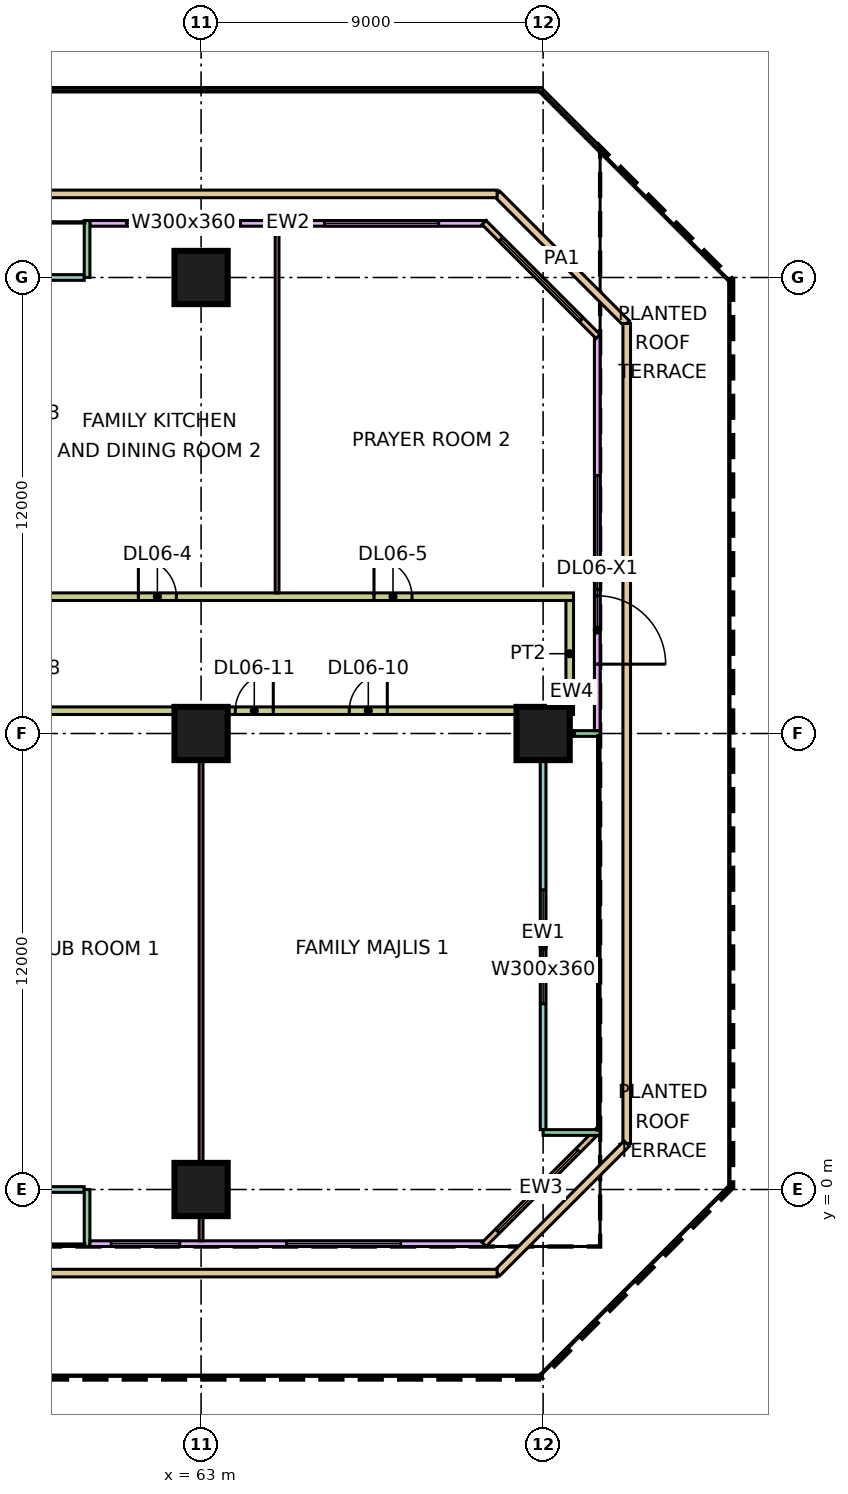
"""IFC4 building model, lengths in metres.
Left out: names, types, materials, properties, quantities, classifications, styles, units other than length and angle.
Written with IfcOpenShell. Run it as: python <this file> out.ifc"""

import sys

from ifc_helpers import new_model, si_unit, direction, frame, frame_2d, origin, origin_2d, place, context, subcontext, project, spatial, rectangle, extrude, element, fill, save


model = new_model("IFC4")
c1 = context("Model", 3, precision=1e-05, world=origin(), true_north=direction((0.0, 1.0)))
c2 = subcontext(c1, "Body", "Model", "MODEL_VIEW")
j1 = project(units=[si_unit("LENGTHUNIT", "METRE"), si_unit("PLANEANGLEUNIT", "RADIAN")], contexts=[c1])
p1 = place(None, origin())
s1 = spatial("IfcSite", under=j1, at=p1, CompositionType="ELEMENT")
p2 = place(p1, origin())
s2 = spatial("IfcBuilding", under=s1, at=p2, CompositionType="ELEMENT")
p3 = place(p2, frame((0.0, 0.0, 35.4)))
s3 = spatial("IfcBuildingStorey", under=s2, at=p3, CompositionType="ELEMENT", Elevation=35.4)
for number, where, z_axis, x_axis in (
    (1, (63.0, 0.0, 0.0), (0.0, 0.0, 1.0), (1.0, 0.0, 0.0)),
    (2, (63.0, 12.0, 0.0), (0.0, 0.0, 1.0), (1.0, 0.0, 0.0)),
    (3, (63.0, 24.0, 0.0), (0.0, 0.0, 1.0), (1.0, 0.0, 0.0)),
    (4, (72.0, 12.0, 0.0), (0.0, 0.0, 1.0), (1.0, 0.0, 0.0)),
):
    element("IfcColumn", number, at=place(p3, frame(where, z_axis=z_axis, x_axis=x_axis)), inside=s3, PredefinedType="COLUMN", context=c2, shape_type="SweptSolid", body=[
        extrude(rectangle(XDim=1.4, YDim=1.4, at=origin_2d()), origin(), (0.0, 0.0, 1.0), 6.0),
    ])
p4 = place(p3, frame((70.5, 25.425, 0.0), z_axis=(0.0, 0.0, 1.0), x_axis=(-1.0, 0.0, 0.0)))
e5 = element("IfcWall", 5, at=p4, inside=s3, PredefinedType="SOLIDWALL", context=c2, shape_type="SweptSolid", body=[
    extrude(rectangle(XDim=10.425, YDim=0.15, at=frame_2d((5.212, 0.0))), origin(), (0.0, 0.0, 1.0), 5.6),
])
p5 = place(p4, frame((1.25, 0.0, 0.45)))
e6 = element("IfcOpeningElement", 6, at=p5, cuts=e5, PredefinedType="OPENING", context=c2, shape_type="SweptSolid", body=[
    extrude(rectangle(XDim=3.0, YDim=3.6, at=frame_2d((1.5, 1.8))), frame((0.0, 0.085, 0.0), z_axis=(0.0, -1.0, 0.0), x_axis=(1.0, 0.0, 0.0)), (0.0, 0.0, 1.0), 0.17),
])
p6 = place(p4, frame((6.462, 0.0, 0.45)))
e7 = element("IfcOpeningElement", 7, at=p6, cuts=e5, PredefinedType="OPENING", context=c2, shape_type="SweptSolid", body=[
    extrude(rectangle(XDim=3.0, YDim=3.6, at=frame_2d((1.5, 1.8))), frame((0.0, 0.085, 0.0), z_axis=(0.0, -1.0, 0.0), x_axis=(1.0, 0.0, 0.0)), (0.0, 0.0, 1.0), 0.17),
])
p7 = place(p3, frame((59.925, 24.0, 0.0), z_axis=(0.0, 0.0, 1.0), x_axis=(-1.0, 0.0, 0.0)))
e8 = element("IfcWall", 8, at=p7, inside=s3, PredefinedType="SOLIDWALL", context=c2, shape_type="SweptSolid", body=[
    extrude(rectangle(XDim=11.85, YDim=0.15, at=frame_2d((5.925, 0.0))), origin(), (0.0, 0.0, 1.0), 5.6),
])
p8 = place(p7, frame((1.625, 0.0, 0.45)))
e9 = element("IfcOpeningElement", 9, at=p8, cuts=e8, PredefinedType="OPENING", context=c2, shape_type="SweptSolid", body=[
    extrude(rectangle(XDim=3.0, YDim=3.6, at=frame_2d((1.5, 1.8))), frame((0.0, 0.085, 0.0), z_axis=(0.0, -1.0, 0.0), x_axis=(1.0, 0.0, 0.0)), (0.0, 0.0, 1.0), 0.17),
])
p9 = place(p7, frame((8.087, 0.0, 0.45)))
e10 = element("IfcOpeningElement", 10, at=p9, cuts=e8, PredefinedType="OPENING", context=c2, shape_type="SweptSolid", body=[
    extrude(rectangle(XDim=3.0, YDim=3.6, at=frame_2d((1.5, 1.8))), frame((0.0, 0.085, 0.0), z_axis=(0.0, -1.0, 0.0), x_axis=(1.0, 0.0, 0.0)), (0.0, 0.0, 1.0), 0.17),
])
p10 = place(p3, frame((60.0, 25.5, 0.0), z_axis=(0.0, 0.0, 1.0), x_axis=(0.0, -1.0, 0.0)))
e11 = element("IfcWall", 11, at=p10, inside=s3, PredefinedType="SOLIDWALL", context=c2, shape_type="SweptSolid", body=[
    extrude(rectangle(XDim=1.5, YDim=0.15, at=frame_2d((0.75, 0.0))), origin(), (0.0, 0.0, 1.0), 5.6),
])
p11 = place(p3, frame((48.075, 0.0, 0.0), z_axis=(0.0, 0.0, 1.0), x_axis=(1.0, 0.0, 0.0)))
e12 = element("IfcWall", 12, at=p11, inside=s3, PredefinedType="SOLIDWALL", context=c2, shape_type="SweptSolid", body=[
    extrude(rectangle(XDim=11.85, YDim=0.15, at=frame_2d((5.925, 0.0))), origin(), (0.0, 0.0, 1.0), 5.6),
])
p12 = place(p11, frame((2.125, 0.0, 0.45)))
e13 = element("IfcOpeningElement", 13, at=p12, cuts=e12, PredefinedType="OPENING", context=c2, shape_type="SweptSolid", body=[
    extrude(rectangle(XDim=2.4, YDim=3.6, at=frame_2d((1.2, 1.8))), frame((0.0, 0.085, 0.0), z_axis=(0.0, -1.0, 0.0), x_axis=(1.0, 0.0, 0.0)), (0.0, 0.0, 1.0), 0.17),
])
p13 = place(p11, frame((7.788, 0.0, 0.45)))
e14 = element("IfcOpeningElement", 14, at=p13, cuts=e12, PredefinedType="OPENING", context=c2, shape_type="SweptSolid", body=[
    extrude(rectangle(XDim=3.0, YDim=3.6, at=frame_2d((1.5, 1.8))), frame((0.0, 0.085, 0.0), z_axis=(0.0, -1.0, 0.0), x_axis=(1.0, 0.0, 0.0)), (0.0, 0.0, 1.0), 0.17),
])
p14 = place(p3, frame((60.0, -1.5, 0.0), z_axis=(0.0, 0.0, 1.0), x_axis=(0.0, 1.0, 0.0)))
e15 = element("IfcWall", 15, at=p14, inside=s3, PredefinedType="SOLIDWALL", context=c2, shape_type="SweptSolid", body=[
    extrude(rectangle(XDim=1.5, YDim=0.15, at=frame_2d((0.75, 0.0))), origin(), (0.0, 0.0, 1.0), 5.6),
])
p15 = place(p3, frame((60.075, -1.425, 0.0), z_axis=(0.0, 0.0, 1.0), x_axis=(1.0, 0.0, 0.0)))
e16 = element("IfcWall", 16, at=p15, inside=s3, PredefinedType="SOLIDWALL", context=c2, shape_type="SweptSolid", body=[
    extrude(rectangle(XDim=10.425, YDim=0.15, at=frame_2d((5.212, 0.0))), origin(), (0.0, 0.0, 1.0), 5.6),
])
p16 = place(p15, frame((0.562, 0.0, 0.45)))
e17 = element("IfcOpeningElement", 17, at=p16, cuts=e16, PredefinedType="OPENING", context=c2, shape_type="SweptSolid", body=[
    extrude(rectangle(XDim=1.8, YDim=3.6, at=frame_2d((0.9, 1.8))), frame((0.0, 0.085, 0.0), z_axis=(0.0, -1.0, 0.0), x_axis=(1.0, 0.0, 0.0)), (0.0, 0.0, 1.0), 0.17),
])
p17 = place(p15, frame((5.175, 0.0, 0.45)))
e18 = element("IfcOpeningElement", 18, at=p17, cuts=e16, PredefinedType="OPENING", context=c2, shape_type="SweptSolid", body=[
    extrude(rectangle(XDim=3.0, YDim=3.6, at=frame_2d((1.5, 1.8))), frame((0.0, 0.085, 0.0), z_axis=(0.0, -1.0, 0.0), x_axis=(1.0, 0.0, 0.0)), (0.0, 0.0, 1.0), 0.17),
])
p18 = place(p3, frame((70.447, -1.447, 0.0), z_axis=(0.0, 0.0, 1.0), x_axis=(0.707106781187, 0.707106781187, 0.0)))
e19 = element("IfcWall", 19, at=p18, inside=s3, PredefinedType="SOLIDWALL", context=c2, shape_type="SweptSolid", body=[
    extrude(rectangle(XDim=4.243, YDim=0.15, at=frame_2d((2.121, 0.0))), origin(), (0.0, 0.0, 1.0), 5.6),
])
p19 = place(p18, frame((0.498, 0.0, 0.45)))
e20 = element("IfcOpeningElement", 20, at=p19, cuts=e19, PredefinedType="OPENING", context=c2, shape_type="SweptSolid", body=[
    extrude(rectangle(XDim=3.0, YDim=3.6, at=frame_2d((1.5, 1.8))), frame((0.0, 0.085, 0.0), z_axis=(0.0, -1.0, 0.0), x_axis=(1.0, 0.0, 0.0)), (0.0, 0.0, 1.0), 0.17),
])
p20 = place(p3, frame((72.0, 1.575, 0.0), z_axis=(0.0, 0.0, 1.0), x_axis=(0.0, 1.0, 0.0)))
e21 = element("IfcWall", 21, at=p20, inside=s3, PredefinedType="SOLIDWALL", context=c2, shape_type="SweptSolid", body=[
    extrude(rectangle(XDim=10.35, YDim=0.15, at=frame_2d((5.175, 0.0))), origin(), (0.0, 0.0, 1.0), 5.6),
])
p21 = place(p20, frame((3.312, 0.0, 0.45)))
e22 = element("IfcOpeningElement", 22, at=p21, cuts=e21, PredefinedType="OPENING", context=c2, shape_type="SweptSolid", body=[
    extrude(rectangle(XDim=3.0, YDim=3.6, at=frame_2d((1.5, 1.8))), frame((0.0, 0.085, 0.0), z_axis=(0.0, -1.0, 0.0), x_axis=(1.0, 0.0, 0.0)), (0.0, 0.0, 1.0), 0.17),
])
for number, where, z_axis, x_axis in (
    (23, (73.5, 1.5, 0.0), (0.0, 0.0, 1.0), (-1.0, 0.0, 0.0)),
    (24, (73.5, 12.0, 0.0), (0.0, 0.0, 1.0), (-1.0, 0.0, 0.0)),
):
    element("IfcWall", number, at=place(p3, frame(where, z_axis=z_axis, x_axis=x_axis)), inside=s3, PredefinedType="SOLIDWALL", context=c2, shape_type="SweptSolid", body=[
        extrude(rectangle(XDim=1.5, YDim=0.15, at=frame_2d((0.75, 0.0))), origin(), (0.0, 0.0, 1.0), 5.6),
    ])
p22 = place(p3, frame((73.425, 12.075, 0.0), z_axis=(0.0, 0.0, 1.0), x_axis=(0.0, 1.0, 0.0)))
e25 = element("IfcWall", 25, at=p22, inside=s3, PredefinedType="SOLIDWALL", context=c2, shape_type="SweptSolid", body=[
    extrude(rectangle(XDim=10.425, YDim=0.15, at=frame_2d((5.212, 0.0))), origin(), (0.0, 0.0, 1.0), 5.6),
])
p23 = place(p22, frame((3.712, 0.0, 0.45)))
e26 = element("IfcOpeningElement", 26, at=p23, cuts=e25, PredefinedType="OPENING", context=c2, shape_type="SweptSolid", body=[
    extrude(rectangle(XDim=3.0, YDim=3.6, at=frame_2d((1.5, 1.8))), frame((0.0, 0.085, 0.0), z_axis=(0.0, -1.0, 0.0), x_axis=(1.0, 0.0, 0.0)), (0.0, 0.0, 1.0), 0.17),
])
p24 = place(p22, frame((1.75, 0.0, 0.0)))
e27 = element("IfcOpeningElement", 27, at=p24, cuts=e25, PredefinedType="OPENING", context=c2, shape_type="SweptSolid", body=[
    extrude(rectangle(XDim=1.8, YDim=2.4, at=frame_2d((0.9, 1.2))), frame((0.0, 0.085, 0.0), z_axis=(0.0, -1.0, 0.0), x_axis=(1.0, 0.0, 0.0)), (0.0, 0.0, 1.0), 0.17),
])
p25 = place(p3, frame((73.447, 22.447, 0.0), z_axis=(0.0, 0.0, 1.0), x_axis=(-0.707106781187, 0.707106781187, 0.0)))
e28 = element("IfcWall", 28, at=p25, inside=s3, PredefinedType="SOLIDWALL", context=c2, shape_type="SweptSolid", body=[
    extrude(rectangle(XDim=4.243, YDim=0.15, at=frame_2d((2.121, 0.0))), origin(), (0.0, 0.0, 1.0), 5.6),
])
p26 = place(p25, frame((0.621, 0.0, 0.45)))
e29 = element("IfcOpeningElement", 29, at=p26, cuts=e28, PredefinedType="OPENING", context=c2, shape_type="SweptSolid", body=[
    extrude(rectangle(XDim=3.0, YDim=3.6, at=frame_2d((1.5, 1.8))), frame((0.0, 0.085, 0.0), z_axis=(0.0, -1.0, 0.0), x_axis=(1.0, 0.0, 0.0)), (0.0, 0.0, 1.0), 0.17),
])
p27 = place(p3, frame((70.79, 26.2, 0.0), z_axis=(0.0, 0.0, 1.0), x_axis=(0.707106781187, -0.707106781187, 0.0)))
e30 = element("IfcWall", 30, at=p27, inside=s3, PredefinedType="PARAPET", context=c2, shape_type="SweptSolid", body=[
    extrude(rectangle(XDim=4.822, YDim=0.2, at=frame_2d((2.411, 0.0))), origin(), (0.0, 0.0, 1.0), 0.5),
])
p28 = place(p3, frame((74.2, 22.79, 0.0), z_axis=(0.0, 0.0, 1.0), x_axis=(0.0, -1.0, 0.0)))
e31 = element("IfcWall", 31, at=p28, inside=s3, PredefinedType="PARAPET", context=c2, shape_type="SweptSolid", body=[
    extrude(rectangle(XDim=21.58, YDim=0.2, at=frame_2d((10.79, 0.0))), origin(), (0.0, 0.0, 1.0), 0.5),
])
p29 = place(p3, frame((74.2, 1.21, 0.0), z_axis=(0.0, 0.0, 1.0), x_axis=(-0.707106781187, -0.707106781187, 0.0)))
e32 = element("IfcWall", 32, at=p29, inside=s3, PredefinedType="PARAPET", context=c2, shape_type="SweptSolid", body=[
    extrude(rectangle(XDim=4.822, YDim=0.2, at=frame_2d((2.411, 0.0))), origin(), (0.0, 0.0, 1.0), 0.5),
])
p30 = place(p3, frame((70.79, -2.2, 0.0), z_axis=(0.0, 0.0, 1.0), x_axis=(-1.0, 0.0, 0.0)))
e33 = element("IfcWall", 33, at=p30, inside=s3, PredefinedType="PARAPET", context=c2, shape_type="SweptSolid", body=[
    extrude(rectangle(XDim=58.58, YDim=0.2, at=frame_2d((29.29, 0.0))), origin(), (0.0, 0.0, 1.0), 0.5),
])
p31 = place(p3, frame((40.79, 26.2, 0.0), z_axis=(0.0, 0.0, 1.0), x_axis=(1.0, 0.0, 0.0)))
e34 = element("IfcWall", 34, at=p31, inside=s3, PredefinedType="PARAPET", context=c2, shape_type="SweptSolid", body=[
    extrude(rectangle(XDim=30.0, YDim=0.2, at=frame_2d((15.0, 0.0))), origin(), (0.0, 0.0, 1.0), 0.5),
])
p32 = place(p3, frame((51.225, 15.6, 0.0), z_axis=(0.0, 0.0, 1.0), x_axis=(1.0, 0.0, 0.0)))
e35 = element("IfcWall", 35, at=p32, inside=s3, PredefinedType="PARTITIONING", context=c2, shape_type="SweptSolid", body=[
    extrude(rectangle(XDim=21.575, YDim=0.2, at=frame_2d((10.788, 0.0))), origin(), (0.0, 0.0, 1.0), 5.6),
])
p33 = place(p32, frame((0.225, 0.0, 0.0)))
e36 = element("IfcOpeningElement", 36, at=p33, cuts=e35, PredefinedType="OPENING", context=c2, shape_type="SweptSolid", body=[
    extrude(rectangle(XDim=1.0, YDim=2.1, at=frame_2d((0.5, 1.05))), frame((0.0, 0.11, 0.0), z_axis=(0.0, -1.0, 0.0), x_axis=(1.0, 0.0, 0.0)), (0.0, 0.0, 1.0), 0.22),
])
p34 = place(p32, frame((3.925, 0.0, 0.0)))
e37 = element("IfcOpeningElement", 37, at=p34, cuts=e35, PredefinedType="OPENING", context=c2, shape_type="SweptSolid", body=[
    extrude(rectangle(XDim=1.0, YDim=2.1, at=frame_2d((0.5, 1.05))), frame((0.0, 0.11, 0.0), z_axis=(0.0, -1.0, 0.0), x_axis=(1.0, 0.0, 0.0)), (0.0, 0.0, 1.0), 0.22),
])
p35 = place(p32, frame((10.125, 0.0, 0.0)))
e38 = element("IfcOpeningElement", 38, at=p35, cuts=e35, PredefinedType="OPENING", context=c2, shape_type="SweptSolid", body=[
    extrude(rectangle(XDim=1.0, YDim=2.1, at=frame_2d((0.5, 1.05))), frame((0.0, 0.11, 0.0), z_axis=(0.0, -1.0, 0.0), x_axis=(1.0, 0.0, 0.0)), (0.0, 0.0, 1.0), 0.22),
])
p36 = place(p32, frame((16.325, 0.0, 0.0)))
e39 = element("IfcOpeningElement", 39, at=p36, cuts=e35, PredefinedType="OPENING", context=c2, shape_type="SweptSolid", body=[
    extrude(rectangle(XDim=1.0, YDim=2.1, at=frame_2d((0.5, 1.05))), frame((0.0, 0.11, 0.0), z_axis=(0.0, -1.0, 0.0), x_axis=(1.0, 0.0, 0.0)), (0.0, 0.0, 1.0), 0.22),
])
p37 = place(p3, frame((54.0, 12.6, 0.0), z_axis=(0.0, 0.0, 1.0), x_axis=(1.0, 0.0, 0.0)))
e40 = element("IfcWall", 40, at=p37, inside=s3, PredefinedType="PARTITIONING", context=c2, shape_type="SweptSolid", body=[
    extrude(rectangle(XDim=18.8, YDim=0.2, at=frame_2d((9.4, 0.0))), origin(), (0.0, 0.0, 1.0), 5.6),
])
p38 = place(p37, frame((3.9, 0.0, 0.0)))
e41 = element("IfcOpeningElement", 41, at=p38, cuts=e40, PredefinedType="OPENING", context=c2, shape_type="SweptSolid", body=[
    extrude(rectangle(XDim=1.0, YDim=2.1, at=frame_2d((0.5, 1.05))), frame((0.0, 0.11, 0.0), z_axis=(0.0, -1.0, 0.0), x_axis=(1.0, 0.0, 0.0)), (0.0, 0.0, 1.0), 0.22),
])
p39 = place(p37, frame((0.9, 0.0, 0.0)))
e42 = element("IfcOpeningElement", 42, at=p39, cuts=e40, PredefinedType="OPENING", context=c2, shape_type="SweptSolid", body=[
    extrude(rectangle(XDim=1.0, YDim=2.1, at=frame_2d((0.5, 1.05))), frame((0.0, 0.11, 0.0), z_axis=(0.0, -1.0, 0.0), x_axis=(1.0, 0.0, 0.0)), (0.0, 0.0, 1.0), 0.22),
])
p40 = place(p37, frame((12.9, 0.0, 0.0)))
e43 = element("IfcOpeningElement", 43, at=p40, cuts=e40, PredefinedType="OPENING", context=c2, shape_type="SweptSolid", body=[
    extrude(rectangle(XDim=1.0, YDim=2.1, at=frame_2d((0.5, 1.05))), frame((0.0, 0.11, 0.0), z_axis=(0.0, -1.0, 0.0), x_axis=(1.0, 0.0, 0.0)), (0.0, 0.0, 1.0), 0.22),
])
p41 = place(p37, frame((9.9, 0.0, 0.0)))
e44 = element("IfcOpeningElement", 44, at=p41, cuts=e40, PredefinedType="OPENING", context=c2, shape_type="SweptSolid", body=[
    extrude(rectangle(XDim=1.0, YDim=2.1, at=frame_2d((0.5, 1.05))), frame((0.0, 0.11, 0.0), z_axis=(0.0, -1.0, 0.0), x_axis=(1.0, 0.0, 0.0)), (0.0, 0.0, 1.0), 0.22),
])
p42 = place(p3, frame((63.0, -1.351, 0.0), z_axis=(0.0, 0.0, 1.0), x_axis=(0.0, 1.0, 0.0)))
e45 = element("IfcWall", 45, at=p42, inside=s3, PredefinedType="PARTITIONING", context=c2, shape_type="SweptSolid", body=[
    extrude(rectangle(XDim=13.851, YDim=0.1, at=frame_2d((6.926, 0.0))), origin(), (0.0, 0.0, 1.0), 5.6),
])
p43 = place(p3, frame((65.0, 15.7, 0.0), z_axis=(0.0, 0.0, 1.0), x_axis=(0.0, 1.0, 0.0)))
e46 = element("IfcWall", 46, at=p43, inside=s3, PredefinedType="PARTITIONING", context=c2, shape_type="SweptSolid", body=[
    extrude(rectangle(XDim=9.651, YDim=0.1, at=frame_2d((4.826, 0.0))), origin(), (0.0, 0.0, 1.0), 5.6),
])
p44 = place(p3, frame((72.0, 12.0, 0.0), z_axis=(0.0, 0.0, 1.0), x_axis=(0.0, 1.0, 0.0)))
e47 = element("IfcWall", 47, at=p44, inside=s3, PredefinedType="PARTITIONING", context=c2, shape_type="SweptSolid", body=[
    extrude(rectangle(XDim=0.5, YDim=0.1, at=frame_2d((0.25, 0.0))), origin(), (0.0, 0.0, 1.0), 5.6),
])
p45 = place(p3, frame((72.7, 12.7, 0.0), z_axis=(0.0, 0.0, 1.0), x_axis=(0.0, 1.0, 0.0)))
e48 = element("IfcWall", 48, at=p45, inside=s3, PredefinedType="PARTITIONING", context=c2, shape_type="SweptSolid", body=[
    extrude(rectangle(XDim=2.8, YDim=0.2, at=frame_2d((1.4, 0.0))), origin(), (0.0, 0.0, 1.0), 5.6),
])
p46 = place(p5, origin())
e49 = element("IfcWindow", 49, at=p46, inside=s3, PartitioningType="SINGLE_PANEL", PredefinedType="WINDOW", context=c2, shape_type="SweptSolid", body=[
    extrude(rectangle(XDim=3.0, YDim=3.6, at=frame_2d((1.5, 1.8))), frame((0.0, 0.03, 0.0), z_axis=(0.0, -1.0, 0.0), x_axis=(1.0, 0.0, 0.0)), (0.0, 0.0, 1.0), 0.06),
])
fill(e6, e49)
p47 = place(p6, origin())
e50 = element("IfcWindow", 50, at=p47, inside=s3, PartitioningType="SINGLE_PANEL", PredefinedType="WINDOW", context=c2, shape_type="SweptSolid", body=[
    extrude(rectangle(XDim=3.0, YDim=3.6, at=frame_2d((1.5, 1.8))), frame((0.0, 0.03, 0.0), z_axis=(0.0, -1.0, 0.0), x_axis=(1.0, 0.0, 0.0)), (0.0, 0.0, 1.0), 0.06),
])
fill(e7, e50)
p48 = place(p16, origin())
e51 = element("IfcWindow", 51, at=p48, inside=s3, PartitioningType="SINGLE_PANEL", PredefinedType="WINDOW", context=c2, shape_type="SweptSolid", body=[
    extrude(rectangle(XDim=1.8, YDim=3.6, at=frame_2d((0.9, 1.8))), frame((0.0, 0.03, 0.0), z_axis=(0.0, -1.0, 0.0), x_axis=(1.0, 0.0, 0.0)), (0.0, 0.0, 1.0), 0.06),
])
fill(e17, e51)
p49 = place(p17, origin())
e52 = element("IfcWindow", 52, at=p49, inside=s3, PartitioningType="SINGLE_PANEL", PredefinedType="WINDOW", context=c2, shape_type="SweptSolid", body=[
    extrude(rectangle(XDim=3.0, YDim=3.6, at=frame_2d((1.5, 1.8))), frame((0.0, 0.03, 0.0), z_axis=(0.0, -1.0, 0.0), x_axis=(1.0, 0.0, 0.0)), (0.0, 0.0, 1.0), 0.06),
])
fill(e18, e52)
p50 = place(p19, origin())
e53 = element("IfcWindow", 53, at=p50, inside=s3, PartitioningType="SINGLE_PANEL", PredefinedType="WINDOW", context=c2, shape_type="SweptSolid", body=[
    extrude(rectangle(XDim=3.0, YDim=3.6, at=frame_2d((1.5, 1.8))), frame((0.0, 0.03, 0.0), z_axis=(0.0, -1.0, 0.0), x_axis=(1.0, 0.0, 0.0)), (0.0, 0.0, 1.0), 0.06),
])
fill(e20, e53)
p51 = place(p21, origin())
e54 = element("IfcWindow", 54, at=p51, inside=s3, PartitioningType="SINGLE_PANEL", PredefinedType="WINDOW", context=c2, shape_type="SweptSolid", body=[
    extrude(rectangle(XDim=3.0, YDim=3.6, at=frame_2d((1.5, 1.8))), frame((0.0, 0.03, 0.0), z_axis=(0.0, -1.0, 0.0), x_axis=(1.0, 0.0, 0.0)), (0.0, 0.0, 1.0), 0.06),
])
fill(e22, e54)
p52 = place(p23, origin())
e55 = element("IfcWindow", 55, at=p52, inside=s3, PartitioningType="SINGLE_PANEL", PredefinedType="WINDOW", context=c2, shape_type="SweptSolid", body=[
    extrude(rectangle(XDim=3.0, YDim=3.6, at=frame_2d((1.5, 1.8))), frame((0.0, 0.03, 0.0), z_axis=(0.0, -1.0, 0.0), x_axis=(1.0, 0.0, 0.0)), (0.0, 0.0, 1.0), 0.06),
])
fill(e26, e55)
p53 = place(p26, origin())
e56 = element("IfcWindow", 56, at=p53, inside=s3, PartitioningType="SINGLE_PANEL", PredefinedType="WINDOW", context=c2, shape_type="SweptSolid", body=[
    extrude(rectangle(XDim=3.0, YDim=3.6, at=frame_2d((1.5, 1.8))), frame((0.0, 0.03, 0.0), z_axis=(0.0, -1.0, 0.0), x_axis=(1.0, 0.0, 0.0)), (0.0, 0.0, 1.0), 0.06),
])
fill(e29, e56)
p54 = place(p24, frame((1.8, 0.0, 0.0), z_axis=(0.0, 0.0, 1.0), x_axis=(-1.0, 0.0, 0.0)))
e57 = element("IfcDoor", 57, at=p54, inside=s3, OperationType="DOUBLE_DOOR_SINGLE_SWING", PredefinedType="DOOR", context=c2, shape_type="SweptSolid", body=[
    extrude(rectangle(XDim=1.8, YDim=2.4, at=frame_2d((0.9, 1.2))), frame((0.0, 0.025, 0.0), z_axis=(0.0, -1.0, 0.0), x_axis=(1.0, 0.0, 0.0)), (0.0, 0.0, 1.0), 0.05),
])
fill(e27, e57)
p55 = place(p35, origin())
e58 = element("IfcDoor", 58, at=p55, inside=s3, OperationType="SINGLE_SWING_LEFT", PredefinedType="DOOR", context=c2, shape_type="SweptSolid", body=[
    extrude(rectangle(XDim=1.0, YDim=2.1, at=frame_2d((0.5, 1.05))), frame((0.0, 0.025, 0.0), z_axis=(0.0, -1.0, 0.0), x_axis=(1.0, 0.0, 0.0)), (0.0, 0.0, 1.0), 0.05),
])
fill(e38, e58)
p56 = place(p36, origin())
e59 = element("IfcDoor", 59, at=p56, inside=s3, OperationType="SINGLE_SWING_LEFT", PredefinedType="DOOR", context=c2, shape_type="SweptSolid", body=[
    extrude(rectangle(XDim=1.0, YDim=2.1, at=frame_2d((0.5, 1.05))), frame((0.0, 0.025, 0.0), z_axis=(0.0, -1.0, 0.0), x_axis=(1.0, 0.0, 0.0)), (0.0, 0.0, 1.0), 0.05),
])
fill(e39, e59)
p57 = place(p40, frame((1.0, 0.0, 0.0), z_axis=(0.0, 0.0, 1.0), x_axis=(-1.0, 0.0, 0.0)))
e60 = element("IfcDoor", 60, at=p57, inside=s3, OperationType="SINGLE_SWING_RIGHT", PredefinedType="DOOR", context=c2, shape_type="SweptSolid", body=[
    extrude(rectangle(XDim=1.0, YDim=2.1, at=frame_2d((0.5, 1.05))), frame((0.0, 0.025, 0.0), z_axis=(0.0, -1.0, 0.0), x_axis=(1.0, 0.0, 0.0)), (0.0, 0.0, 1.0), 0.05),
])
fill(e43, e60)
p58 = place(p41, frame((1.0, 0.0, 0.0), z_axis=(0.0, 0.0, 1.0), x_axis=(-1.0, 0.0, 0.0)))
e61 = element("IfcDoor", 61, at=p58, inside=s3, OperationType="SINGLE_SWING_RIGHT", PredefinedType="DOOR", context=c2, shape_type="SweptSolid", body=[
    extrude(rectangle(XDim=1.0, YDim=2.1, at=frame_2d((0.5, 1.05))), frame((0.0, 0.025, 0.0), z_axis=(0.0, -1.0, 0.0), x_axis=(1.0, 0.0, 0.0)), (0.0, 0.0, 1.0), 0.05),
])
fill(e44, e61)
save(model, sys.argv[1])
